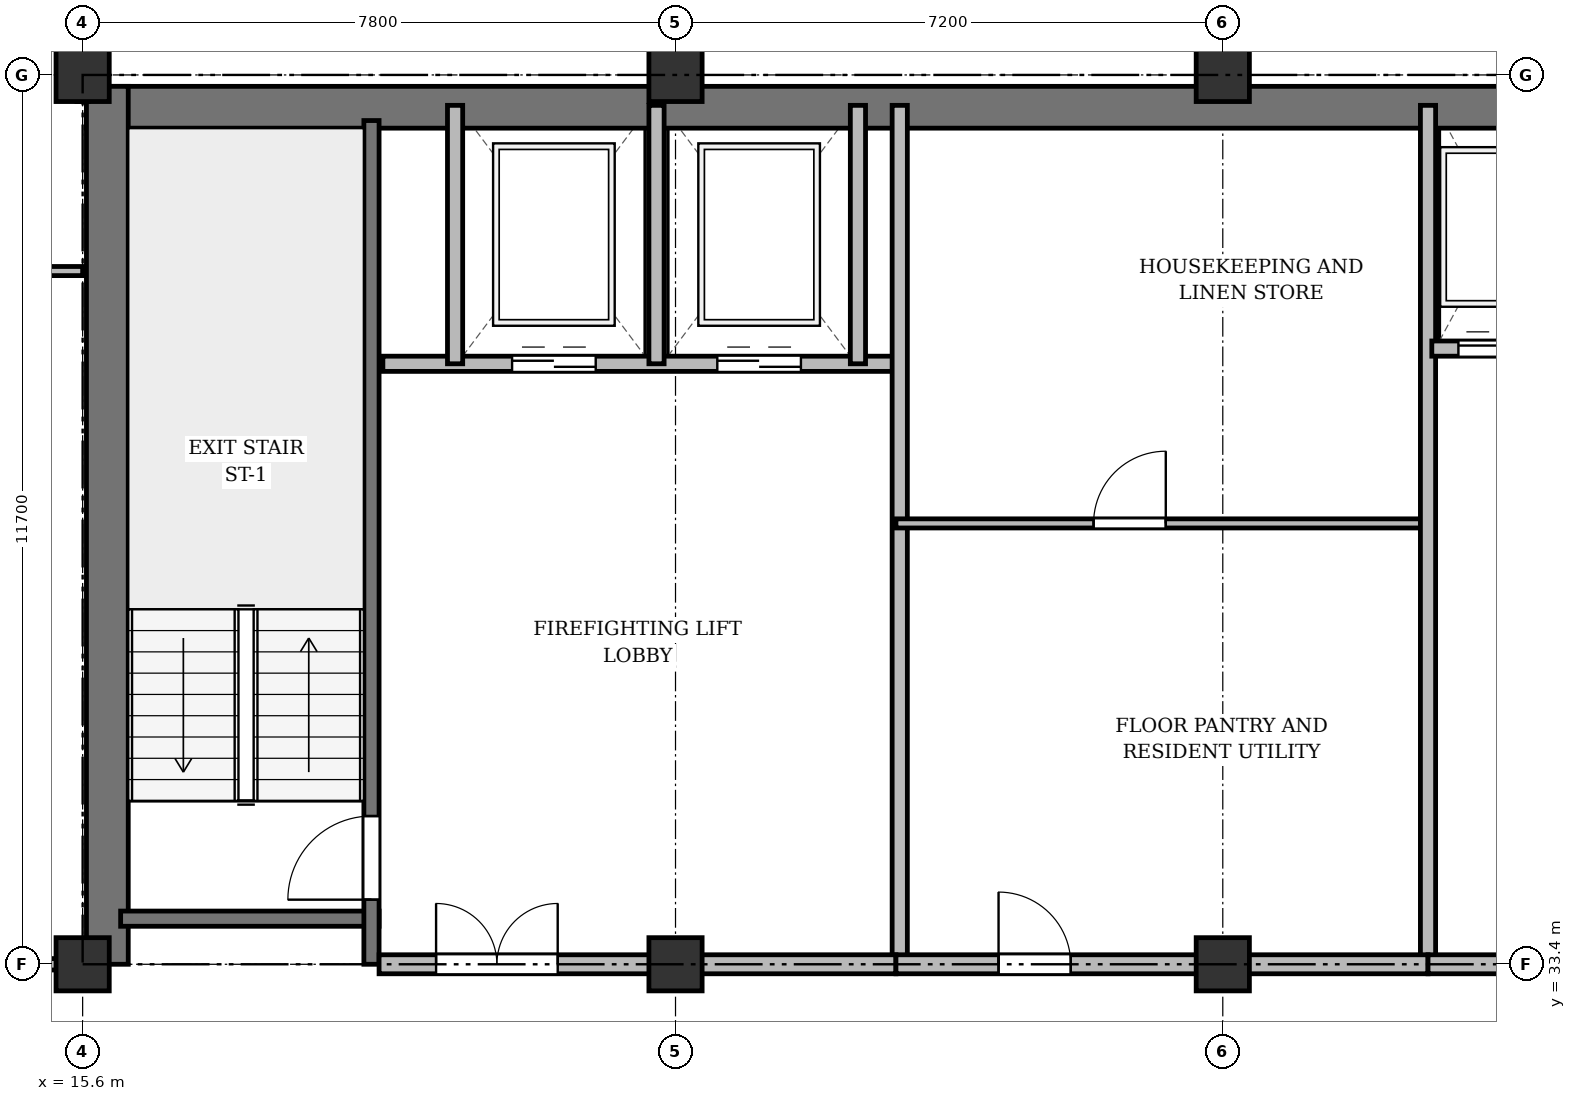
"""IFC4 building model, lengths in metres.
Left out: names, types, materials, properties, quantities, classifications, styles, units other than length and angle.
Written with IfcOpenShell. Run it as: python <this file> out.ifc"""

import sys

from ifc_helpers import new_model, si_unit, direction, frame, frame_2d, origin, origin_2d, place, context, subcontext, project, spatial, rectangle, extrude, source, transform, mapped, element, fill, save


model = new_model("IFC4")
c1 = context("Model", 3, precision=1e-05, world=origin(), true_north=direction((0.0, 1.0)))
c2 = subcontext(c1, "Body", "Model", "MODEL_VIEW")
j1 = project(units=[si_unit("LENGTHUNIT", "METRE"), si_unit("PLANEANGLEUNIT", "RADIAN")], contexts=[c1])
p1 = place(None, origin())
s1 = spatial("IfcSite", under=j1, at=p1, CompositionType="ELEMENT")
p2 = place(p1, origin())
s2 = spatial("IfcBuilding", under=s1, at=p2, CompositionType="ELEMENT")
p3 = place(p2, frame((0.0, 0.0, 178.9)))
s3 = spatial("IfcBuildingStorey", under=s2, at=p3, CompositionType="ELEMENT", Elevation=178.9)
m1 = source(origin(), c2, "Body", "SweptSolid", [
    extrude(rectangle(XDim=0.7, YDim=0.7, at=origin_2d()), origin(), (0.0, 0.0, 1.0), 3.6),
])
for number, where, z_axis, x_axis in (
    (1, (15.6, 33.4, 0.0), (0.0, 0.0, 1.0), (1.0, 0.0, 0.0)),
    (2, (15.6, 45.1, 0.0), (0.0, 0.0, 1.0), (1.0, 0.0, 0.0)),
    (3, (23.4, 33.4, 0.0), (0.0, 0.0, 1.0), (1.0, 0.0, 0.0)),
    (4, (23.4, 45.1, 0.0), (0.0, 0.0, 1.0), (1.0, 0.0, 0.0)),
    (5, (30.6, 33.4, 0.0), (0.0, 0.0, 1.0), (1.0, 0.0, 0.0)),
    (6, (30.6, 45.1, 0.0), (0.0, 0.0, 1.0), (1.0, 0.0, 0.0)),
):
    element("IfcColumn", number, at=place(p3, frame(where, z_axis=z_axis, x_axis=x_axis)), inside=s3, PredefinedType="COLUMN", context=c2, shape_type="MappedRepresentation", body=[
        mapped(m1, transform((0.0, 0.0, 0.0), x_axis=(1.0, 0.0, 0.0), y_axis=(0.0, 1.0, 0.0), z_axis=(0.0, 0.0, 1.0), scale=1.0)),
    ])
p4 = place(p3, frame((15.65, 44.675, 0.0), z_axis=(0.0, 0.0, 1.0), x_axis=(1.0, 0.0, 0.0)))
e7 = element("IfcWall", 7, at=p4, inside=s3, PredefinedType="SHEAR", context=c2, shape_type="SweptSolid", body=[
    extrude(rectangle(XDim=43.1, YDim=0.55, at=frame_2d((21.55, 0.0))), origin(), (0.0, 0.0, 1.0), 3.22),
])
p5 = place(p3, frame((15.925, 33.4, 0.0), z_axis=(0.0, 0.0, 1.0), x_axis=(0.0, 1.0, 0.0)))
e8 = element("IfcWall", 8, at=p5, inside=s3, PredefinedType="SHEAR", context=c2, shape_type="SweptSolid", body=[
    extrude(rectangle(XDim=11.55, YDim=0.55, at=frame_2d((5.775, 0.0))), origin(), (0.0, 0.0, 1.0), 3.22),
])
p6 = place(p3, frame((16.1, 34.0, 0.0), z_axis=(0.0, 0.0, 1.0), x_axis=(1.0, 0.0, 0.0)))
e9 = element("IfcWall", 9, at=p6, inside=s3, PredefinedType="SHEAR", context=c2, shape_type="SweptSolid", body=[
    extrude(rectangle(XDim=3.4, YDim=0.2, at=frame_2d((1.7, 0.0))), origin(), (0.0, 0.0, 1.0), 3.22),
])
p7 = place(p3, frame((19.4, 33.4, 0.0), z_axis=(0.0, 0.0, 1.0), x_axis=(0.0, 1.0, 0.0)))
e10 = element("IfcWall", 10, at=p7, inside=s3, PredefinedType="SHEAR", context=c2, shape_type="SweptSolid", body=[
    extrude(rectangle(XDim=11.1, YDim=0.2, at=frame_2d((5.55, 0.0))), origin(), (0.0, 0.0, 1.0), 3.22),
])
p8 = place(p7, frame((0.85, 0.0, 0.0)))
e11 = element("IfcOpeningElement", 11, at=p8, cuts=e10, PredefinedType="OPENING", context=c2, shape_type="SweptSolid", body=[
    extrude(rectangle(XDim=1.1, YDim=2.15, at=frame_2d((0.55, 1.075))), frame((0.0, 0.11, 0.0), z_axis=(0.0, -1.0, 0.0), x_axis=(1.0, 0.0, 0.0)), (0.0, 0.0, 1.0), 0.22),
])
p9 = place(p3, frame((19.55, 41.3, 0.0), z_axis=(0.0, 0.0, 1.0), x_axis=(1.0, 0.0, 0.0)))
e12 = element("IfcWall", 12, at=p9, inside=s3, PredefinedType="SOLIDWALL", context=c2, shape_type="SweptSolid", body=[
    extrude(rectangle(XDim=6.75, YDim=0.2, at=frame_2d((3.375, 0.0))), origin(), (0.0, 0.0, 1.0), 3.22),
])
p10 = place(p9, frame((1.7, 0.0, 0.0)))
e13 = element("IfcOpeningElement", 13, at=p10, cuts=e12, PredefinedType="OPENING", context=c2, shape_type="SweptSolid", body=[
    extrude(rectangle(XDim=1.1, YDim=2.15, at=frame_2d((0.55, 1.075))), frame((0.0, 0.11, 0.0), z_axis=(0.0, -1.0, 0.0), x_axis=(1.0, 0.0, 0.0)), (0.0, 0.0, 1.0), 0.22),
])
p11 = place(p9, frame((4.4, 0.0, 0.0)))
e14 = element("IfcOpeningElement", 14, at=p11, cuts=e12, PredefinedType="OPENING", context=c2, shape_type="SweptSolid", body=[
    extrude(rectangle(XDim=1.1, YDim=2.15, at=frame_2d((0.55, 1.075))), frame((0.0, 0.11, 0.0), z_axis=(0.0, -1.0, 0.0), x_axis=(1.0, 0.0, 0.0)), (0.0, 0.0, 1.0), 0.22),
])
for number, where, z_axis, x_axis in (
    (15, (20.5, 41.3, 0.0), (0.0, 0.0, 1.0), (0.0, 1.0, 0.0)),
    (16, (23.15, 41.3, 0.0), (0.0, 0.0, 1.0), (0.0, 1.0, 0.0)),
    (17, (25.8, 41.3, 0.0), (0.0, 0.0, 1.0), (0.0, 1.0, 0.0)),
):
    element("IfcWall", number, at=place(p3, frame(where, z_axis=z_axis, x_axis=x_axis)), inside=s3, PredefinedType="SOLIDWALL", context=c2, shape_type="SweptSolid", body=[
        extrude(rectangle(XDim=3.4, YDim=0.2, at=frame_2d((1.7, 0.0))), origin(), (0.0, 0.0, 1.0), 3.22),
    ])
p12 = place(p3, frame((26.35, 33.4, 0.0), z_axis=(0.0, 0.0, 1.0), x_axis=(0.0, 1.0, 0.0)))
e18 = element("IfcWall", 18, at=p12, inside=s3, PredefinedType="SOLIDWALL", context=c2, shape_type="SweptSolid", body=[
    extrude(rectangle(XDim=11.3, YDim=0.2, at=frame_2d((5.65, 0.0))), origin(), (0.0, 0.0, 1.0), 2.62),
])
p13 = place(p3, frame((19.5, 33.4, 0.0), z_axis=(0.0, 0.0, 1.0), x_axis=(1.0, 0.0, 0.0)))
e19 = element("IfcWall", 19, at=p13, inside=s3, PredefinedType="PARTITIONING", context=c2, shape_type="SweptSolid", body=[
    extrude(rectangle(XDim=6.8, YDim=0.25, at=frame_2d((3.4, 0.0))), origin(), (0.0, 0.0, 1.0), 2.62),
])
p14 = place(p13, frame((0.75, 0.0, 0.0)))
e20 = element("IfcOpeningElement", 20, at=p14, cuts=e19, PredefinedType="OPENING", context=c2, shape_type="SweptSolid", body=[
    extrude(rectangle(XDim=1.6, YDim=2.2, at=frame_2d((0.8, 1.1))), frame((0.0, 0.135, 0.0), z_axis=(0.0, -1.0, 0.0), x_axis=(1.0, 0.0, 0.0)), (0.0, 0.0, 1.0), 0.27),
])
p15 = place(p3, frame((26.3, 39.2, 0.0), z_axis=(0.0, 0.0, 1.0), x_axis=(1.0, 0.0, 0.0)))
e21 = element("IfcWall", 21, at=p15, inside=s3, PredefinedType="PARTITIONING", context=c2, shape_type="SweptSolid", body=[
    extrude(rectangle(XDim=7.0, YDim=0.12, at=frame_2d((3.5, 0.0))), origin(), (0.0, 0.0, 1.0), 2.72),
])
p16 = place(p15, frame((2.6, 0.0, 0.0)))
e22 = element("IfcOpeningElement", 22, at=p16, cuts=e21, PredefinedType="OPENING", context=c2, shape_type="SweptSolid", body=[
    extrude(rectangle(XDim=0.95, YDim=2.15, at=frame_2d((0.475, 1.075))), frame((0.0, 0.07, 0.0), z_axis=(0.0, -1.0, 0.0), x_axis=(1.0, 0.0, 0.0)), (0.0, 0.0, 1.0), 0.14),
])
p17 = place(p3, frame((33.3, 33.4, 0.0), z_axis=(0.0, 0.0, 1.0), x_axis=(0.0, 1.0, 0.0)))
e23 = element("IfcWall", 23, at=p17, inside=s3, PredefinedType="SOLIDWALL", context=c2, shape_type="SweptSolid", body=[
    extrude(rectangle(XDim=11.3, YDim=0.2, at=frame_2d((5.65, 0.0))), origin(), (0.0, 0.0, 1.0), 2.62),
])
p18 = place(p3, frame((33.35, 41.5, 0.0), z_axis=(0.0, 0.0, 1.0), x_axis=(1.0, 0.0, 0.0)))
e24 = element("IfcWall", 24, at=p18, inside=s3, PredefinedType="SOLIDWALL", context=c2, shape_type="SweptSolid", body=[
    extrude(rectangle(XDim=6.9, YDim=0.2, at=frame_2d((3.45, 0.0))), origin(), (0.0, 0.0, 1.0), 3.22),
])
p19 = place(p18, frame((0.35, 0.0, 0.0)))
e25 = element("IfcOpeningElement", 25, at=p19, cuts=e24, PredefinedType="OPENING", context=c2, shape_type="SweptSolid", body=[
    extrude(rectangle(XDim=1.05, YDim=2.15, at=frame_2d((0.525, 1.075))), frame((0.0, 0.11, 0.0), z_axis=(0.0, -1.0, 0.0), x_axis=(1.0, 0.0, 0.0)), (0.0, 0.0, 1.0), 0.22),
])
p20 = place(p18, frame((2.05, 0.0, 0.0)))
e26 = element("IfcOpeningElement", 26, at=p20, cuts=e24, PredefinedType="OPENING", context=c2, shape_type="SweptSolid", body=[
    extrude(rectangle(XDim=1.05, YDim=2.15, at=frame_2d((0.525, 1.075))), frame((0.0, 0.11, 0.0), z_axis=(0.0, -1.0, 0.0), x_axis=(1.0, 0.0, 0.0)), (0.0, 0.0, 1.0), 0.22),
])
p21 = place(p18, frame((3.75, 0.0, 0.0)))
e27 = element("IfcOpeningElement", 27, at=p21, cuts=e24, PredefinedType="OPENING", context=c2, shape_type="SweptSolid", body=[
    extrude(rectangle(XDim=1.05, YDim=2.15, at=frame_2d((0.525, 1.075))), frame((0.0, 0.11, 0.0), z_axis=(0.0, -1.0, 0.0), x_axis=(1.0, 0.0, 0.0)), (0.0, 0.0, 1.0), 0.22),
])
p22 = place(p18, frame((5.45, 0.0, 0.0)))
e28 = element("IfcOpeningElement", 28, at=p22, cuts=e24, PredefinedType="OPENING", context=c2, shape_type="SweptSolid", body=[
    extrude(rectangle(XDim=1.05, YDim=2.15, at=frame_2d((0.525, 1.075))), frame((0.0, 0.11, 0.0), z_axis=(0.0, -1.0, 0.0), x_axis=(1.0, 0.0, 0.0)), (0.0, 0.0, 1.0), 0.22),
])
p23 = place(p3, frame((26.3, 33.4, 0.0), z_axis=(0.0, 0.0, 1.0), x_axis=(1.0, 0.0, 0.0)))
e29 = element("IfcWall", 29, at=p23, inside=s3, PredefinedType="PARTITIONING", context=c2, shape_type="SweptSolid", body=[
    extrude(rectangle(XDim=7.0, YDim=0.25, at=frame_2d((3.5, 0.0))), origin(), (0.0, 0.0, 1.0), 2.62),
])
p24 = place(p23, frame((1.35, 0.0, 0.0)))
e30 = element("IfcOpeningElement", 30, at=p24, cuts=e29, PredefinedType="OPENING", context=c2, shape_type="SweptSolid", body=[
    extrude(rectangle(XDim=0.95, YDim=2.15, at=frame_2d((0.475, 1.075))), frame((0.0, 0.135, 0.0), z_axis=(0.0, -1.0, 0.0), x_axis=(1.0, 0.0, 0.0)), (0.0, 0.0, 1.0), 0.27),
])
p25 = place(p3, frame((33.3, 33.4, 0.0), z_axis=(0.0, 0.0, 1.0), x_axis=(1.0, 0.0, 0.0)))
e31 = element("IfcWall", 31, at=p25, inside=s3, PredefinedType="PARTITIONING", context=c2, shape_type="SweptSolid", body=[
    extrude(rectangle(XDim=13.85, YDim=0.25, at=frame_2d((6.925, 0.0))), origin(), (0.0, 0.0, 1.0), 2.62),
])
p26 = place(p25, frame((4.2, 0.0, 0.0)))
e32 = element("IfcOpeningElement", 32, at=p26, cuts=e31, PredefinedType="OPENING", context=c2, shape_type="SweptSolid", body=[
    extrude(rectangle(XDim=1.6, YDim=2.2, at=frame_2d((0.8, 1.1))), frame((0.0, 0.135, 0.0), z_axis=(0.0, -1.0, 0.0), x_axis=(1.0, 0.0, 0.0)), (0.0, 0.0, 1.0), 0.27),
])
p27 = place(p3, frame((11.825, 42.52, 0.0), z_axis=(0.0, 0.0, 1.0), x_axis=(1.0, 0.0, 0.0)))
e33 = element("IfcWall", 33, at=p27, inside=s3, PredefinedType="PARTITIONING", context=c2, shape_type="SweptSolid", body=[
    extrude(rectangle(XDim=3.775, YDim=0.12, at=frame_2d((1.888, 0.0))), origin(), (0.0, 0.0, 1.0), 2.72),
])
p28 = place(p27, frame((1.319, 0.0, 0.0)))
e34 = element("IfcOpeningElement", 34, at=p28, cuts=e33, PredefinedType="OPENING", context=c2, shape_type="SweptSolid", body=[
    extrude(rectangle(XDim=0.95, YDim=2.15, at=frame_2d((0.475, 1.075))), frame((0.0, 0.07, 0.0), z_axis=(0.0, -1.0, 0.0), x_axis=(1.0, 0.0, 0.0)), (0.0, 0.0, 1.0), 0.14),
])
p29 = place(p3, frame((8.05, 33.4, 0.0), z_axis=(0.0, 0.0, 1.0), x_axis=(1.0, 0.0, 0.0)))
e35 = element("IfcWall", 35, at=p29, inside=s3, PredefinedType="PARTITIONING", context=c2, shape_type="SweptSolid", body=[
    extrude(rectangle(XDim=7.55, YDim=0.15, at=frame_2d((3.775, 0.0))), origin(), (0.0, 0.0, 1.0), 2.62),
])
p30 = place(p29, frame((4.375, 0.0, 0.0)))
e36 = element("IfcOpeningElement", 36, at=p30, cuts=e35, PredefinedType="OPENING", context=c2, shape_type="SweptSolid", body=[
    extrude(rectangle(XDim=0.95, YDim=2.15, at=frame_2d((0.475, 1.075))), frame((0.0, 0.085, 0.0), z_axis=(0.0, -1.0, 0.0), x_axis=(1.0, 0.0, 0.0)), (0.0, 0.0, 1.0), 0.17),
])
p31 = place(p3, frame((15.6, 44.75, 0.0), z_axis=(0.0, 0.0, 1.0), x_axis=(0.0, 1.0, 0.0)))
e37 = element("IfcWall", 37, at=p31, inside=s3, PredefinedType="PARTITIONING", context=c2, shape_type="SweptSolid", body=[
    extrude(rectangle(XDim=3.61, YDim=0.15, at=frame_2d((1.805, 0.0))), origin(), (0.0, 0.0, 1.0), 2.72),
])
p32 = place(p31, frame((1.1, 0.0, 0.0)))
e38 = element("IfcOpeningElement", 38, at=p32, cuts=e37, PredefinedType="OPENING", context=c2, shape_type="SweptSolid", body=[
    extrude(rectangle(XDim=0.95, YDim=2.15, at=frame_2d((0.475, 1.075))), frame((0.0, 0.085, 0.0), z_axis=(0.0, -1.0, 0.0), x_axis=(1.0, 0.0, 0.0)), (0.0, 0.0, 1.0), 0.17),
])
m2 = source(origin(), c2, "Body", "SweptSolid", [
    extrude(rectangle(XDim=1.1, YDim=2.15, at=frame_2d((0.55, 1.075))), frame((0.0, 0.025, 0.0), z_axis=(0.0, -1.0, 0.0), x_axis=(1.0, 0.0, 0.0)), (0.0, 0.0, 1.0), 0.05),
])
p33 = place(p8, origin())
e39 = element("IfcDoor", 39, at=p33, inside=s3, OperationType="SINGLE_SWING_LEFT", PredefinedType="DOOR", context=c2, shape_type="MappedRepresentation", body=[
    mapped(m2, transform((0.0, 0.0, 0.0), x_axis=(1.0, 0.0, 0.0), y_axis=(0.0, 1.0, 0.0), z_axis=(0.0, 0.0, 1.0), scale=1.0)),
])
fill(e11, e39)
p34 = place(p10, origin())
e40 = element("IfcDoor", 40, at=p34, inside=s3, OperationType="DOUBLE_DOOR_SLIDING", PredefinedType="DOOR", context=c2, shape_type="MappedRepresentation", body=[
    mapped(m2, transform((0.0, 0.0, 0.0), x_axis=(1.0, 0.0, 0.0), y_axis=(0.0, 1.0, 0.0), z_axis=(0.0, 0.0, 1.0), scale=1.0)),
])
fill(e13, e40)
p35 = place(p11, origin())
e41 = element("IfcDoor", 41, at=p35, inside=s3, OperationType="DOUBLE_DOOR_SLIDING", PredefinedType="DOOR", context=c2, shape_type="MappedRepresentation", body=[
    mapped(m2, transform((0.0, 0.0, 0.0), x_axis=(1.0, 0.0, 0.0), y_axis=(0.0, 1.0, 0.0), z_axis=(0.0, 0.0, 1.0), scale=1.0)),
])
fill(e14, e41)
m3 = source(origin(), c2, "Body", "SweptSolid", [
    extrude(rectangle(XDim=1.6, YDim=2.2, at=frame_2d((0.8, 1.1))), frame((0.0, 0.025, 0.0), z_axis=(0.0, -1.0, 0.0), x_axis=(1.0, 0.0, 0.0)), (0.0, 0.0, 1.0), 0.05),
])
p36 = place(p14, origin())
e42 = element("IfcDoor", 42, at=p36, inside=s3, OperationType="DOUBLE_DOOR_SINGLE_SWING", PredefinedType="DOOR", context=c2, shape_type="MappedRepresentation", body=[
    mapped(m3, transform((0.0, 0.0, 0.0), x_axis=(1.0, 0.0, 0.0), y_axis=(0.0, 1.0, 0.0), z_axis=(0.0, 0.0, 1.0), scale=1.0)),
])
fill(e20, e42)
m4 = source(origin(), c2, "Body", "SweptSolid", [
    extrude(rectangle(XDim=0.95, YDim=2.15, at=frame_2d((0.475, 1.075))), frame((0.0, 0.025, 0.0), z_axis=(0.0, -1.0, 0.0), x_axis=(1.0, 0.0, 0.0)), (0.0, 0.0, 1.0), 0.05),
])
p37 = place(p16, origin())
e43 = element("IfcDoor", 43, at=p37, inside=s3, OperationType="SINGLE_SWING_RIGHT", PredefinedType="DOOR", context=c2, shape_type="MappedRepresentation", body=[
    mapped(m4, transform((0.0, 0.0, 0.0), x_axis=(1.0, 0.0, 0.0), y_axis=(0.0, 1.0, 0.0), z_axis=(0.0, 0.0, 1.0), scale=1.0)),
])
fill(e22, e43)
m5 = source(origin(), c2, "Body", "SweptSolid", [
    extrude(rectangle(XDim=1.05, YDim=2.15, at=frame_2d((0.525, 1.075))), frame((0.0, 0.025, 0.0), z_axis=(0.0, -1.0, 0.0), x_axis=(1.0, 0.0, 0.0)), (0.0, 0.0, 1.0), 0.05),
])
p38 = place(p19, origin())
e44 = element("IfcDoor", 44, at=p38, inside=s3, OperationType="DOUBLE_DOOR_SLIDING", PredefinedType="DOOR", context=c2, shape_type="MappedRepresentation", body=[
    mapped(m5, transform((0.0, 0.0, 0.0), x_axis=(1.0, 0.0, 0.0), y_axis=(0.0, 1.0, 0.0), z_axis=(0.0, 0.0, 1.0), scale=1.0)),
])
fill(e25, e44)
p39 = place(p24, origin())
e45 = element("IfcDoor", 45, at=p39, inside=s3, OperationType="SINGLE_SWING_LEFT", PredefinedType="DOOR", context=c2, shape_type="MappedRepresentation", body=[
    mapped(m4, transform((0.0, 0.0, 0.0), x_axis=(1.0, 0.0, 0.0), y_axis=(0.0, 1.0, 0.0), z_axis=(0.0, 0.0, 1.0), scale=1.0)),
])
fill(e30, e45)
save(model, sys.argv[1])
